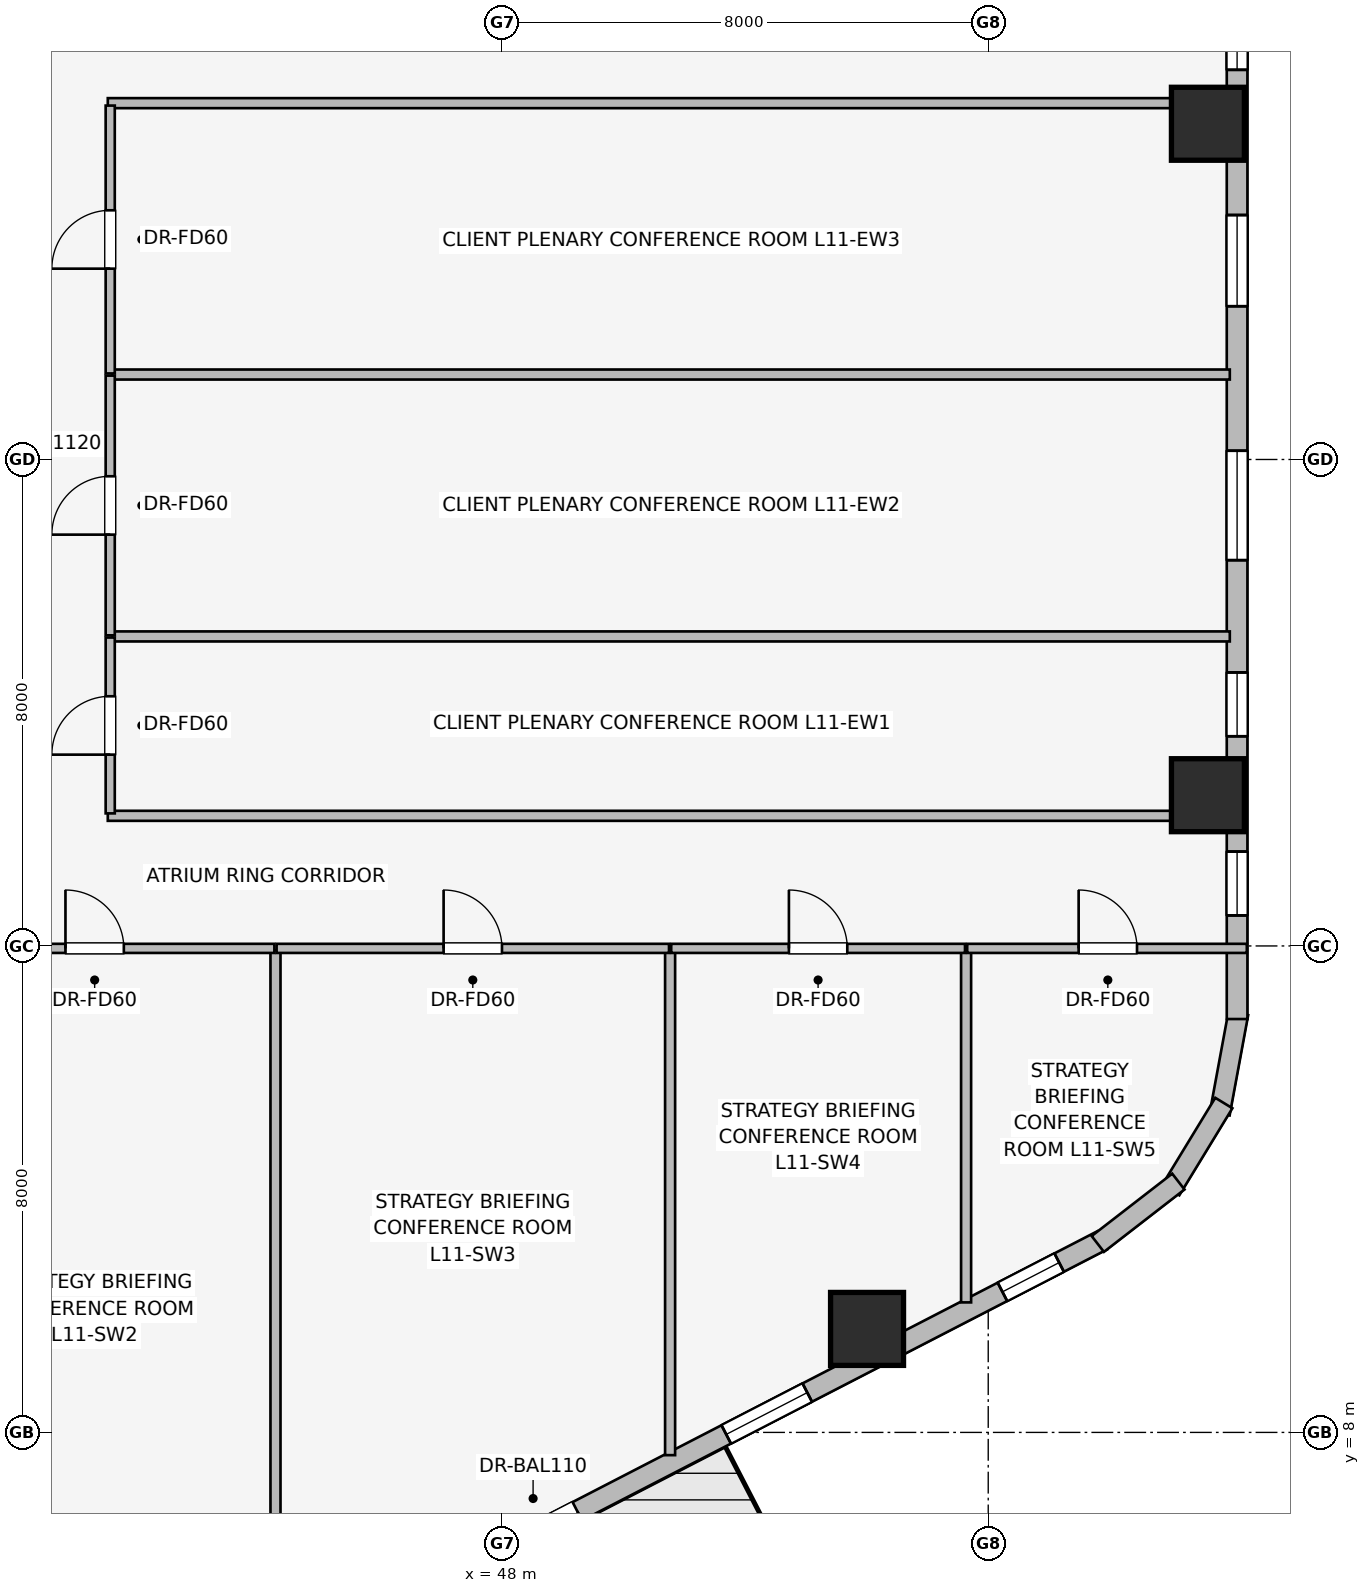
"""IFC4 building model, lengths in metres.
Left out: names, types, materials, properties, quantities, classifications, styles, units other than length and angle.
Written with IfcOpenShell. Run it as: python <this file> out.ifc"""

import sys

from ifc_helpers import new_model, si_unit, direction, frame, frame_2d, origin, origin_2d, place, context, subcontext, project, spatial, rectangle, extrude, element, fill, save


model = new_model("IFC4")
c1 = context("Model", 3, precision=1e-05, world=origin(), true_north=direction((0.0, 1.0)))
c2 = subcontext(c1, "Body", "Model", "MODEL_VIEW")
j1 = project(units=[si_unit("LENGTHUNIT", "METRE"), si_unit("PLANEANGLEUNIT", "RADIAN")], contexts=[c1])
p1 = place(None, origin())
s1 = spatial("IfcSite", under=j1, at=p1, CompositionType="ELEMENT")
p2 = place(p1, origin())
s2 = spatial("IfcBuilding", under=s1, at=p2, CompositionType="ELEMENT")
p3 = place(p2, frame((0.0, 0.0, 45.25)))
s3 = spatial("IfcBuildingStorey", under=s2, at=p3, CompositionType="ELEMENT", Elevation=45.25)
for number, where, z_axis, x_axis in (
    (1, (54.007, 9.702, 0.0), (0.0, 0.0, 1.0), (1.0, 0.0, 0.0)),
    (2, (59.613, 18.479, 0.0), (0.0, 0.0, 1.0), (1.0, 0.0, 0.0)),
    (3, (59.613, 29.521, 0.0), (0.0, 0.0, 1.0), (1.0, 0.0, 0.0)),
):
    element("IfcColumn", number, at=place(p3, frame(where, z_axis=z_axis, x_axis=x_axis)), inside=s3, PredefinedType="COLUMN", context=c2, shape_type="SweptSolid", body=[
        extrude(rectangle(XDim=1.2, YDim=1.2, at=origin_2d()), origin(), (0.0, 0.0, 1.0), 3.65),
    ])
p4 = place(p3, frame((57.876, 11.159, 0.0), z_axis=(0.0, 0.0, 1.0), x_axis=(-0.888634413993, -0.458616264721, 0.0)))
e4 = element("IfcWall", 4, at=p4, inside=s3, PredefinedType="STANDARD", context=c2, shape_type="SweptSolid", body=[
    extrude(rectangle(XDim=20.531, YDim=0.34, at=frame_2d((10.266, 0.0))), origin(), (0.0, 0.0, 1.0), 2.684),
])
p5 = place(p4, frame((9.716, 0.0, 0.0)))
e5 = element("IfcOpeningElement", 5, at=p5, cuts=e4, PredefinedType="OPENING", context=c2, shape_type="SweptSolid", body=[
    extrude(rectangle(XDim=1.1, YDim=2.04, at=frame_2d((0.55, 1.02))), frame((0.0, 0.18, 0.0), z_axis=(0.0, -1.0, 0.0), x_axis=(1.0, 0.0, 0.0)), (0.0, 0.0, 1.0), 0.36),
])
p6 = place(p4, frame((0.798, 0.0, 0.75)))
e6 = element("IfcOpeningElement", 6, at=p6, cuts=e4, PredefinedType="OPENING", context=c2, shape_type="SweptSolid", body=[
    extrude(rectangle(XDim=1.05, YDim=1.4, at=frame_2d((0.525, 0.7))), frame((0.0, 0.18, 0.0), z_axis=(0.0, -1.0, 0.0), x_axis=(1.0, 0.0, 0.0)), (0.0, 0.0, 1.0), 0.36),
])
p7 = place(p4, frame((5.46, 0.0, 0.75)))
e7 = element("IfcOpeningElement", 7, at=p7, cuts=e4, PredefinedType="OPENING", context=c2, shape_type="SweptSolid", body=[
    extrude(rectangle(XDim=1.5, YDim=1.5, at=frame_2d((0.75, 0.75))), frame((0.0, 0.18, 0.0), z_axis=(0.0, -1.0, 0.0), x_axis=(1.0, 0.0, 0.0)), (0.0, 0.0, 1.0), 0.36),
])
p8 = place(p4, frame((12.107, 0.0, 0.75)))
e8 = element("IfcOpeningElement", 8, at=p8, cuts=e4, PredefinedType="OPENING", context=c2, shape_type="SweptSolid", body=[
    extrude(rectangle(XDim=1.8, YDim=1.5, at=frame_2d((0.9, 0.75))), frame((0.0, 0.18, 0.0), z_axis=(0.0, -1.0, 0.0), x_axis=(1.0, 0.0, 0.0)), (0.0, 0.0, 1.0), 0.36),
])
p9 = place(p4, frame((17.823, 0.0, 0.75)))
e9 = element("IfcOpeningElement", 9, at=p9, cuts=e4, PredefinedType="OPENING", context=c2, shape_type="SweptSolid", body=[
    extrude(rectangle(XDim=1.5, YDim=1.5, at=frame_2d((0.75, 0.75))), frame((0.0, 0.18, 0.0), z_axis=(0.0, -1.0, 0.0), x_axis=(1.0, 0.0, 0.0)), (0.0, 0.0, 1.0), 0.36),
])
p10 = place(p3, frame((60.113, 14.892, 0.0), z_axis=(0.0, 0.0, 1.0), x_axis=(-0.181714143354, -0.983351397063, 0.0)))
e10 = element("IfcWall", 10, at=p10, inside=s3, PredefinedType="STANDARD", context=c2, shape_type="SweptSolid", body=[
    extrude(rectangle(XDim=1.678, YDim=0.33, at=frame_2d((0.839, 0.0))), origin(), (0.0, 0.0, 1.0), 3.39),
])
p11 = place(p3, frame((59.875, 13.417, 0.0), z_axis=(0.0, 0.0, 1.0), x_axis=(-0.520584129191, -0.853810379671, 0.0)))
e11 = element("IfcWall", 11, at=p11, inside=s3, PredefinedType="STANDARD", context=c2, shape_type="SweptSolid", body=[
    extrude(rectangle(XDim=1.677, YDim=0.33, at=frame_2d((0.838, 0.0))), origin(), (0.0, 0.0, 1.0), 3.39),
])
p12 = place(p3, frame((59.127, 12.125, 0.0), z_axis=(0.0, 0.0, 1.0), x_axis=(-0.790691856293, -0.61221433207, 0.0)))
e12 = element("IfcWall", 12, at=p12, inside=s3, PredefinedType="STANDARD", context=c2, shape_type="SweptSolid", body=[
    extrude(rectangle(XDim=1.676, YDim=0.33, at=frame_2d((0.838, 0.0))), origin(), (0.0, 0.0, 1.0), 3.39),
])
p13 = place(p3, frame((60.093, 33.202, 0.0), z_axis=(0.0, 0.0, 1.0), x_axis=(0.0, -1.0, 0.0)))
e13 = element("IfcWall", 13, at=p13, inside=s3, PredefinedType="STANDARD", context=c2, shape_type="SweptSolid", body=[
    extrude(rectangle(XDim=18.404, YDim=0.34, at=frame_2d((9.202, 0.0))), origin(), (0.0, 0.0, 1.0), 2.684),
])
p14 = place(p13, frame((1.744, 0.0, 0.75)))
e14 = element("IfcOpeningElement", 14, at=p14, cuts=e13, PredefinedType="OPENING", context=c2, shape_type="SweptSolid", body=[
    extrude(rectangle(XDim=1.05, YDim=1.4, at=frame_2d((0.525, 0.7))), frame((0.0, 0.18, 0.0), z_axis=(0.0, -1.0, 0.0), x_axis=(1.0, 0.0, 0.0)), (0.0, 0.0, 1.0), 0.36),
])
p15 = place(p13, frame((5.182, 0.0, 0.75)))
e15 = element("IfcOpeningElement", 15, at=p15, cuts=e13, PredefinedType="OPENING", context=c2, shape_type="SweptSolid", body=[
    extrude(rectangle(XDim=1.5, YDim=1.5, at=frame_2d((0.75, 0.75))), frame((0.0, 0.18, 0.0), z_axis=(0.0, -1.0, 0.0), x_axis=(1.0, 0.0, 0.0)), (0.0, 0.0, 1.0), 0.36),
])
p16 = place(p13, frame((9.058, 0.0, 0.75)))
e16 = element("IfcOpeningElement", 16, at=p16, cuts=e13, PredefinedType="OPENING", context=c2, shape_type="SweptSolid", body=[
    extrude(rectangle(XDim=1.8, YDim=1.5, at=frame_2d((0.9, 0.75))), frame((0.0, 0.18, 0.0), z_axis=(0.0, -1.0, 0.0), x_axis=(1.0, 0.0, 0.0)), (0.0, 0.0, 1.0), 0.36),
])
p17 = place(p13, frame((12.704, 0.0, 0.75)))
e17 = element("IfcOpeningElement", 17, at=p17, cuts=e13, PredefinedType="OPENING", context=c2, shape_type="SweptSolid", body=[
    extrude(rectangle(XDim=1.05, YDim=1.4, at=frame_2d((0.525, 0.7))), frame((0.0, 0.18, 0.0), z_axis=(0.0, -1.0, 0.0), x_axis=(1.0, 0.0, 0.0)), (0.0, 0.0, 1.0), 0.36),
])
p18 = place(p13, frame((15.65, 0.0, 0.75)))
e18 = element("IfcOpeningElement", 18, at=p18, cuts=e13, PredefinedType="OPENING", context=c2, shape_type="SweptSolid", body=[
    extrude(rectangle(XDim=1.05, YDim=1.4, at=frame_2d((0.525, 0.7))), frame((0.0, 0.18, 0.0), z_axis=(0.0, -1.0, 0.0), x_axis=(1.0, 0.0, 0.0)), (0.0, 0.0, 1.0), 0.36),
])
for number, where, z_axis, x_axis in (
    (19, (41.52, 18.14, 0.0), (0.0, 0.0, 1.0), (1.0, 0.0, 0.0)),
    (20, (41.52, 29.86, 0.0), (0.0, 0.0, 1.0), (1.0, 0.0, 0.0)),
):
    element("IfcWall", number, at=place(p3, frame(where, z_axis=z_axis, x_axis=x_axis)), inside=s3, PredefinedType="PARTITIONING", context=c2, shape_type="SweptSolid", body=[
        extrude(rectangle(XDim=18.453, YDim=0.165, at=frame_2d((9.227, 0.0))), origin(), (0.0, 0.0, 1.0), 2.298),
    ])
for number, where, z_axis, x_axis in (
    (21, (41.59, 21.09, 0.0), (0.0, 0.0, 1.0), (1.0, 0.0, 0.0)),
    (22, (41.59, 25.397, 0.0), (0.0, 0.0, 1.0), (1.0, 0.0, 0.0)),
):
    element("IfcWall", number, at=place(p3, frame(where, z_axis=z_axis, x_axis=x_axis)), inside=s3, PredefinedType="PARTITIONING", context=c2, shape_type="SweptSolid", body=[
        extrude(rectangle(XDim=18.383, YDim=0.165, at=frame_2d((9.191, 0.0))), origin(), (0.0, 0.0, 1.0), 3.39),
    ])
p19 = place(p3, frame((41.56, 18.18, 0.0), z_axis=(0.0, 0.0, 1.0), x_axis=(0.0, 1.0, 0.0)))
e23 = element("IfcWall", 23, at=p19, inside=s3, PredefinedType="PARTITIONING", context=c2, shape_type="SweptSolid", body=[
    extrude(rectangle(XDim=2.892, YDim=0.15, at=frame_2d((1.446, 0.0))), origin(), (0.0, 0.0, 1.0), 3.39),
])
p20 = place(p19, frame((0.966, 0.0, 0.0)))
e24 = element("IfcOpeningElement", 24, at=p20, cuts=e23, PredefinedType="OPENING", context=c2, shape_type="SweptSolid", body=[
    extrude(rectangle(XDim=0.96, YDim=2.0, at=frame_2d((0.48, 1.0))), frame((0.0, 0.085, 0.0), z_axis=(0.0, -1.0, 0.0), x_axis=(1.0, 0.0, 0.0)), (0.0, 0.0, 1.0), 0.17),
])
p21 = place(p3, frame((41.56, 21.108, 0.0), z_axis=(0.0, 0.0, 1.0), x_axis=(0.0, 1.0, 0.0)))
e25 = element("IfcWall", 25, at=p21, inside=s3, PredefinedType="PARTITIONING", context=c2, shape_type="SweptSolid", body=[
    extrude(rectangle(XDim=4.271, YDim=0.15, at=frame_2d((2.135, 0.0))), origin(), (0.0, 0.0, 1.0), 3.39),
])
p22 = place(p21, frame((1.656, 0.0, 0.0)))
e26 = element("IfcOpeningElement", 26, at=p22, cuts=e25, PredefinedType="OPENING", context=c2, shape_type="SweptSolid", body=[
    extrude(rectangle(XDim=0.96, YDim=2.0, at=frame_2d((0.48, 1.0))), frame((0.0, 0.085, 0.0), z_axis=(0.0, -1.0, 0.0), x_axis=(1.0, 0.0, 0.0)), (0.0, 0.0, 1.0), 0.17),
])
p23 = place(p3, frame((41.56, 25.415, 0.0), z_axis=(0.0, 0.0, 1.0), x_axis=(0.0, 1.0, 0.0)))
e27 = element("IfcWall", 27, at=p23, inside=s3, PredefinedType="PARTITIONING", context=c2, shape_type="SweptSolid", body=[
    extrude(rectangle(XDim=4.405, YDim=0.15, at=frame_2d((2.203, 0.0))), origin(), (0.0, 0.0, 1.0), 3.39),
])
p24 = place(p23, frame((1.723, 0.0, 0.0)))
e28 = element("IfcOpeningElement", 28, at=p24, cuts=e27, PredefinedType="OPENING", context=c2, shape_type="SweptSolid", body=[
    extrude(rectangle(XDim=0.96, YDim=2.0, at=frame_2d((0.48, 1.0))), frame((0.0, 0.085, 0.0), z_axis=(0.0, -1.0, 0.0), x_axis=(1.0, 0.0, 0.0)), (0.0, 0.0, 1.0), 0.17),
])
p25 = place(p3, frame((44.278, 4.276, 0.0), z_axis=(0.0, 0.0, 1.0), x_axis=(0.0, 1.0, 0.0)))
e29 = element("IfcWall", 29, at=p25, inside=s3, PredefinedType="PARTITIONING", context=c2, shape_type="SweptSolid", body=[
    extrude(rectangle(XDim=11.654, YDim=0.165, at=frame_2d((5.827, 0.0))), origin(), (0.0, 0.0, 1.0), 3.39),
])
p26 = place(p3, frame((50.768, 7.626, 0.0), z_axis=(0.0, 0.0, 1.0), x_axis=(0.0, 1.0, 0.0)))
e30 = element("IfcWall", 30, at=p26, inside=s3, PredefinedType="PARTITIONING", context=c2, shape_type="SweptSolid", body=[
    extrude(rectangle(XDim=8.304, YDim=0.165, at=frame_2d((4.152, 0.0))), origin(), (0.0, 0.0, 1.0), 3.39),
])
p27 = place(p3, frame((55.636, 10.138, 0.0), z_axis=(0.0, 0.0, 1.0), x_axis=(0.0, 1.0, 0.0)))
e31 = element("IfcWall", 31, at=p27, inside=s3, PredefinedType="PARTITIONING", context=c2, shape_type="SweptSolid", body=[
    extrude(rectangle(XDim=5.792, YDim=0.165, at=frame_2d((2.896, 0.0))), origin(), (0.0, 0.0, 1.0), 3.39),
])
p28 = place(p3, frame((38.347, 15.96, 0.0), z_axis=(0.0, 0.0, 1.0), x_axis=(1.0, 0.0, 0.0)))
e32 = element("IfcWall", 32, at=p28, inside=s3, PredefinedType="PARTITIONING", context=c2, shape_type="SweptSolid", body=[
    extrude(rectangle(XDim=5.913, YDim=0.15, at=frame_2d((2.957, 0.0))), origin(), (0.0, 0.0, 1.0), 3.39),
])
p29 = place(p28, frame((2.477, 0.0, 0.0)))
e33 = element("IfcOpeningElement", 33, at=p29, cuts=e32, PredefinedType="OPENING", context=c2, shape_type="SweptSolid", body=[
    extrude(rectangle(XDim=0.96, YDim=2.0, at=frame_2d((0.48, 1.0))), frame((0.0, 0.085, 0.0), z_axis=(0.0, -1.0, 0.0), x_axis=(1.0, 0.0, 0.0)), (0.0, 0.0, 1.0), 0.17),
])
p30 = place(p3, frame((44.296, 15.96, 0.0), z_axis=(0.0, 0.0, 1.0), x_axis=(1.0, 0.0, 0.0)))
e34 = element("IfcWall", 34, at=p30, inside=s3, PredefinedType="PARTITIONING", context=c2, shape_type="SweptSolid", body=[
    extrude(rectangle(XDim=6.454, YDim=0.15, at=frame_2d((3.227, 0.0))), origin(), (0.0, 0.0, 1.0), 3.39),
])
p31 = place(p30, frame((2.747, 0.0, 0.0)))
e35 = element("IfcOpeningElement", 35, at=p31, cuts=e34, PredefinedType="OPENING", context=c2, shape_type="SweptSolid", body=[
    extrude(rectangle(XDim=0.96, YDim=2.0, at=frame_2d((0.48, 1.0))), frame((0.0, 0.085, 0.0), z_axis=(0.0, -1.0, 0.0), x_axis=(1.0, 0.0, 0.0)), (0.0, 0.0, 1.0), 0.17),
])
p32 = place(p3, frame((50.786, 15.96, 0.0), z_axis=(0.0, 0.0, 1.0), x_axis=(1.0, 0.0, 0.0)))
e36 = element("IfcWall", 36, at=p32, inside=s3, PredefinedType="PARTITIONING", context=c2, shape_type="SweptSolid", body=[
    extrude(rectangle(XDim=4.832, YDim=0.15, at=frame_2d((2.416, 0.0))), origin(), (0.0, 0.0, 1.0), 3.39),
])
p33 = place(p32, frame((1.936, 0.0, 0.0)))
e37 = element("IfcOpeningElement", 37, at=p33, cuts=e36, PredefinedType="OPENING", context=c2, shape_type="SweptSolid", body=[
    extrude(rectangle(XDim=0.96, YDim=2.0, at=frame_2d((0.48, 1.0))), frame((0.0, 0.085, 0.0), z_axis=(0.0, -1.0, 0.0), x_axis=(1.0, 0.0, 0.0)), (0.0, 0.0, 1.0), 0.17),
])
p34 = place(p3, frame((55.654, 15.96, 0.0), z_axis=(0.0, 0.0, 1.0), x_axis=(1.0, 0.0, 0.0)))
e38 = element("IfcWall", 38, at=p34, inside=s3, PredefinedType="PARTITIONING", context=c2, shape_type="SweptSolid", body=[
    extrude(rectangle(XDim=4.599, YDim=0.15, at=frame_2d((2.299, 0.0))), origin(), (0.0, 0.0, 1.0), 3.39),
])
p35 = place(p34, frame((1.833, 0.0, 0.0)))
e39 = element("IfcOpeningElement", 39, at=p35, cuts=e38, PredefinedType="OPENING", context=c2, shape_type="SweptSolid", body=[
    extrude(rectangle(XDim=0.96, YDim=2.0, at=frame_2d((0.48, 1.0))), frame((0.0, 0.085, 0.0), z_axis=(0.0, -1.0, 0.0), x_axis=(1.0, 0.0, 0.0)), (0.0, 0.0, 1.0), 0.17),
])
p36 = place(p5, origin())
e40 = element("IfcDoor", 40, at=p36, inside=s3, OperationType="SINGLE_SWING_LEFT", PredefinedType="DOOR", context=c2, shape_type="SweptSolid", body=[
    extrude(rectangle(XDim=1.1, YDim=2.04, at=frame_2d((0.55, 1.02))), frame((0.0, 0.025, 0.0), z_axis=(0.0, -1.0, 0.0), x_axis=(1.0, 0.0, 0.0)), (0.0, 0.0, 1.0), 0.05),
])
fill(e5, e40)
p37 = place(p6, origin())
e41 = element("IfcWindow", 41, at=p37, inside=s3, PartitioningType="SINGLE_PANEL", PredefinedType="WINDOW", context=c2, shape_type="SweptSolid", body=[
    extrude(rectangle(XDim=1.05, YDim=1.4, at=frame_2d((0.525, 0.7))), frame((0.0, 0.03, 0.0), z_axis=(0.0, -1.0, 0.0), x_axis=(1.0, 0.0, 0.0)), (0.0, 0.0, 1.0), 0.06),
])
fill(e6, e41)
p38 = place(p7, origin())
e42 = element("IfcWindow", 42, at=p38, inside=s3, PartitioningType="SINGLE_PANEL", PredefinedType="WINDOW", context=c2, shape_type="SweptSolid", body=[
    extrude(rectangle(XDim=1.5, YDim=1.5, at=frame_2d((0.75, 0.75))), frame((0.0, 0.03, 0.0), z_axis=(0.0, -1.0, 0.0), x_axis=(1.0, 0.0, 0.0)), (0.0, 0.0, 1.0), 0.06),
])
fill(e7, e42)
p39 = place(p14, origin())
e43 = element("IfcWindow", 43, at=p39, inside=s3, PartitioningType="SINGLE_PANEL", PredefinedType="WINDOW", context=c2, shape_type="SweptSolid", body=[
    extrude(rectangle(XDim=1.05, YDim=1.4, at=frame_2d((0.525, 0.7))), frame((0.0, 0.03, 0.0), z_axis=(0.0, -1.0, 0.0), x_axis=(1.0, 0.0, 0.0)), (0.0, 0.0, 1.0), 0.06),
])
fill(e14, e43)
p40 = place(p15, origin())
e44 = element("IfcWindow", 44, at=p40, inside=s3, PartitioningType="SINGLE_PANEL", PredefinedType="WINDOW", context=c2, shape_type="SweptSolid", body=[
    extrude(rectangle(XDim=1.5, YDim=1.5, at=frame_2d((0.75, 0.75))), frame((0.0, 0.03, 0.0), z_axis=(0.0, -1.0, 0.0), x_axis=(1.0, 0.0, 0.0)), (0.0, 0.0, 1.0), 0.06),
])
fill(e15, e44)
p41 = place(p16, origin())
e45 = element("IfcWindow", 45, at=p41, inside=s3, PartitioningType="SINGLE_PANEL", PredefinedType="WINDOW", context=c2, shape_type="SweptSolid", body=[
    extrude(rectangle(XDim=1.8, YDim=1.5, at=frame_2d((0.9, 0.75))), frame((0.0, 0.03, 0.0), z_axis=(0.0, -1.0, 0.0), x_axis=(1.0, 0.0, 0.0)), (0.0, 0.0, 1.0), 0.06),
])
fill(e16, e45)
p42 = place(p17, origin())
e46 = element("IfcWindow", 46, at=p42, inside=s3, PartitioningType="SINGLE_PANEL", PredefinedType="WINDOW", context=c2, shape_type="SweptSolid", body=[
    extrude(rectangle(XDim=1.05, YDim=1.4, at=frame_2d((0.525, 0.7))), frame((0.0, 0.03, 0.0), z_axis=(0.0, -1.0, 0.0), x_axis=(1.0, 0.0, 0.0)), (0.0, 0.0, 1.0), 0.06),
])
fill(e17, e46)
p43 = place(p18, origin())
e47 = element("IfcWindow", 47, at=p43, inside=s3, PartitioningType="SINGLE_PANEL", PredefinedType="WINDOW", context=c2, shape_type="SweptSolid", body=[
    extrude(rectangle(XDim=1.05, YDim=1.4, at=frame_2d((0.525, 0.7))), frame((0.0, 0.03, 0.0), z_axis=(0.0, -1.0, 0.0), x_axis=(1.0, 0.0, 0.0)), (0.0, 0.0, 1.0), 0.06),
])
fill(e18, e47)
p44 = place(p20, origin())
e48 = element("IfcDoor", 48, at=p44, inside=s3, OperationType="SINGLE_SWING_LEFT", PredefinedType="DOOR", context=c2, shape_type="SweptSolid", body=[
    extrude(rectangle(XDim=0.96, YDim=2.0, at=frame_2d((0.48, 1.0))), frame((0.0, 0.025, 0.0), z_axis=(0.0, -1.0, 0.0), x_axis=(1.0, 0.0, 0.0)), (0.0, 0.0, 1.0), 0.05),
])
fill(e24, e48)
p45 = place(p22, origin())
e49 = element("IfcDoor", 49, at=p45, inside=s3, OperationType="SINGLE_SWING_LEFT", PredefinedType="DOOR", context=c2, shape_type="SweptSolid", body=[
    extrude(rectangle(XDim=0.96, YDim=2.0, at=frame_2d((0.48, 1.0))), frame((0.0, 0.025, 0.0), z_axis=(0.0, -1.0, 0.0), x_axis=(1.0, 0.0, 0.0)), (0.0, 0.0, 1.0), 0.05),
])
fill(e26, e49)
p46 = place(p24, origin())
e50 = element("IfcDoor", 50, at=p46, inside=s3, OperationType="SINGLE_SWING_LEFT", PredefinedType="DOOR", context=c2, shape_type="SweptSolid", body=[
    extrude(rectangle(XDim=0.96, YDim=2.0, at=frame_2d((0.48, 1.0))), frame((0.0, 0.025, 0.0), z_axis=(0.0, -1.0, 0.0), x_axis=(1.0, 0.0, 0.0)), (0.0, 0.0, 1.0), 0.05),
])
fill(e28, e50)
p47 = place(p29, origin())
e51 = element("IfcDoor", 51, at=p47, inside=s3, OperationType="SINGLE_SWING_LEFT", PredefinedType="DOOR", context=c2, shape_type="SweptSolid", body=[
    extrude(rectangle(XDim=0.96, YDim=2.0, at=frame_2d((0.48, 1.0))), frame((0.0, 0.025, 0.0), z_axis=(0.0, -1.0, 0.0), x_axis=(1.0, 0.0, 0.0)), (0.0, 0.0, 1.0), 0.05),
])
fill(e33, e51)
p48 = place(p31, origin())
e52 = element("IfcDoor", 52, at=p48, inside=s3, OperationType="SINGLE_SWING_LEFT", PredefinedType="DOOR", context=c2, shape_type="SweptSolid", body=[
    extrude(rectangle(XDim=0.96, YDim=2.0, at=frame_2d((0.48, 1.0))), frame((0.0, 0.025, 0.0), z_axis=(0.0, -1.0, 0.0), x_axis=(1.0, 0.0, 0.0)), (0.0, 0.0, 1.0), 0.05),
])
fill(e35, e52)
p49 = place(p33, origin())
e53 = element("IfcDoor", 53, at=p49, inside=s3, OperationType="SINGLE_SWING_LEFT", PredefinedType="DOOR", context=c2, shape_type="SweptSolid", body=[
    extrude(rectangle(XDim=0.96, YDim=2.0, at=frame_2d((0.48, 1.0))), frame((0.0, 0.025, 0.0), z_axis=(0.0, -1.0, 0.0), x_axis=(1.0, 0.0, 0.0)), (0.0, 0.0, 1.0), 0.05),
])
fill(e37, e53)
p50 = place(p35, origin())
e54 = element("IfcDoor", 54, at=p50, inside=s3, OperationType="SINGLE_SWING_LEFT", PredefinedType="DOOR", context=c2, shape_type="SweptSolid", body=[
    extrude(rectangle(XDim=0.96, YDim=2.0, at=frame_2d((0.48, 1.0))), frame((0.0, 0.025, 0.0), z_axis=(0.0, -1.0, 0.0), x_axis=(1.0, 0.0, 0.0)), (0.0, 0.0, 1.0), 0.05),
])
fill(e39, e54)
save(model, sys.argv[1])
